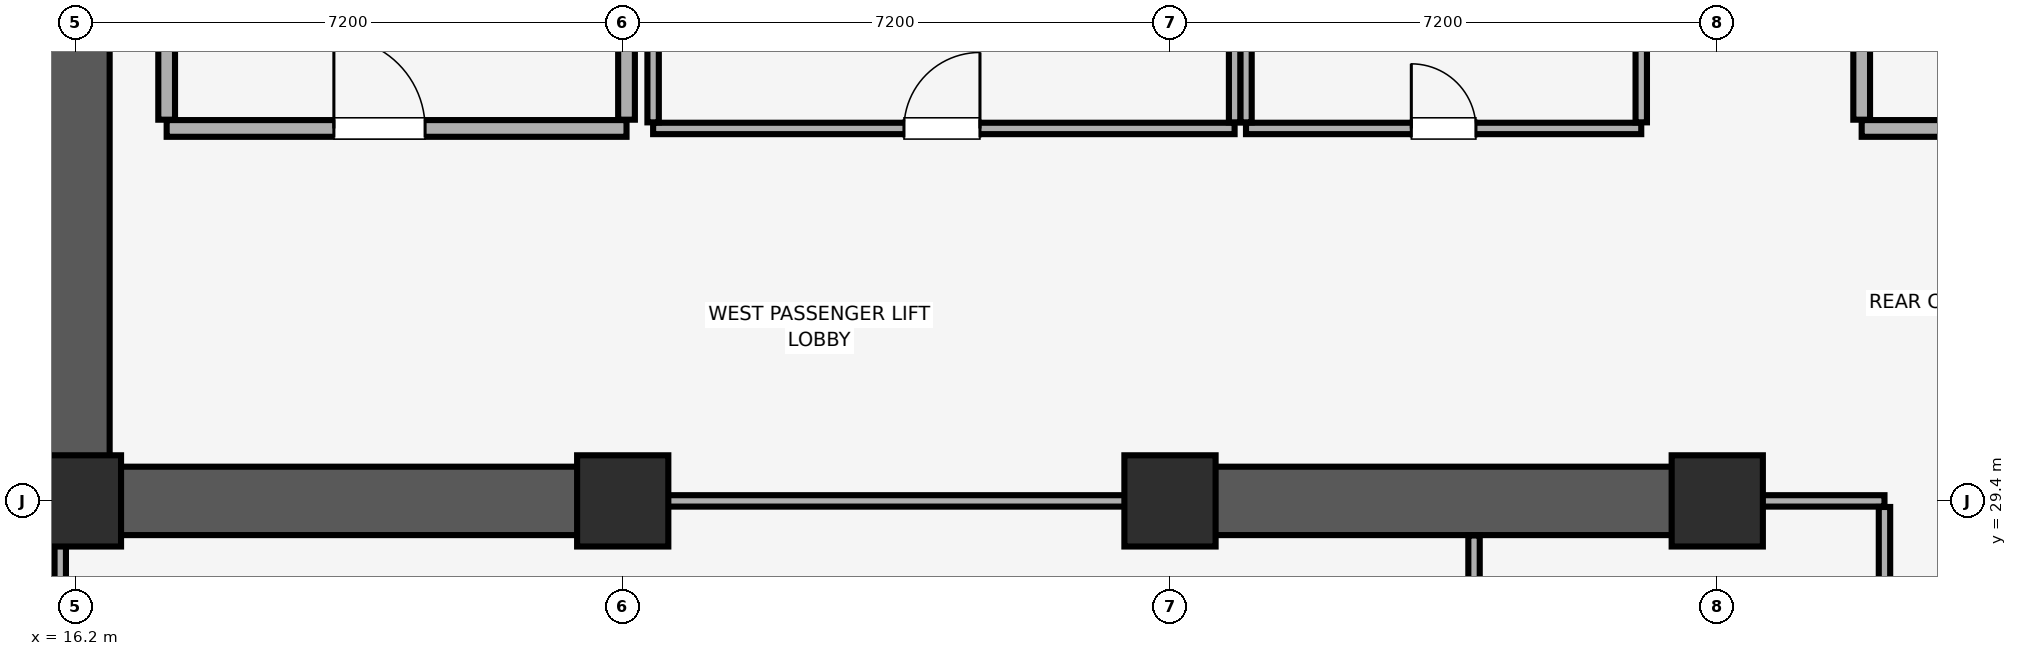
"""IFC4 building model, lengths in metres.
Left out: names, types, materials, properties, quantities, classifications, styles, units other than length and angle.
Written with IfcOpenShell. Run it as: python <this file> out.ifc"""

import sys

from ifc_helpers import new_model, si_unit, direction, frame, frame_2d, origin, origin_2d, place, context, subcontext, project, spatial, rectangle, extrude, element, fill, save


model = new_model("IFC4")
c1 = context("Model", 3, precision=1e-05, world=origin(), true_north=direction((0.0, 1.0)))
c2 = subcontext(c1, "Body", "Model", "MODEL_VIEW")
j1 = project(units=[si_unit("LENGTHUNIT", "METRE"), si_unit("PLANEANGLEUNIT", "RADIAN")], contexts=[c1])
p1 = place(None, origin())
s1 = spatial("IfcSite", under=j1, at=p1, CompositionType="ELEMENT")
p2 = place(p1, origin())
s2 = spatial("IfcBuilding", under=s1, at=p2, CompositionType="ELEMENT")
p3 = place(p2, frame((0.0, 0.0, 220.55)))
s3 = spatial("IfcBuildingStorey", under=s2, at=p3, CompositionType="ELEMENT", Elevation=220.55)
for number, where, z_axis, x_axis in (
    (1, (16.2, 29.4, 0.0), (0.0, 0.0, 1.0), (1.0, 0.0, 0.0)),
    (2, (23.4, 29.4, 0.0), (0.0, 0.0, 1.0), (1.0, 0.0, 0.0)),
    (3, (30.6, 29.4, 0.0), (0.0, 0.0, 1.0), (1.0, 0.0, 0.0)),
    (4, (37.8, 29.4, 0.0), (0.0, 0.0, 1.0), (1.0, 0.0, 0.0)),
):
    element("IfcColumn", number, at=place(p3, frame(where, z_axis=z_axis, x_axis=x_axis)), inside=s3, PredefinedType="COLUMN", context=c2, shape_type="SweptSolid", body=[
        extrude(rectangle(XDim=1.2, YDim=1.2, at=origin_2d()), origin(), (0.0, 0.0, 1.0), 3.56),
    ])
p4 = place(p3, frame((16.2, 29.4, 0.0), z_axis=(0.0, 0.0, 1.0), x_axis=(0.0, 1.0, 0.0)))
e5 = element("IfcWall", 5, at=p4, inside=s3, PredefinedType="SHEAR", context=c2, shape_type="SweptSolid", body=[
    extrude(rectangle(XDim=19.2, YDim=0.9, at=frame_2d((9.6, 0.0))), origin(), (0.0, 0.0, 1.0), 3.56),
])
p5 = place(p3, frame((16.655, 29.4, 0.0), z_axis=(0.0, 0.0, 1.0), x_axis=(1.0, 0.0, 0.0)))
e6 = element("IfcWall", 6, at=p5, inside=s3, PredefinedType="SHEAR", context=c2, shape_type="SweptSolid", body=[
    extrude(rectangle(XDim=6.945, YDim=0.9, at=frame_2d((3.473, 0.0))), origin(), (0.0, 0.0, 1.0), 3.56),
])
p6 = place(p3, frame((30.4, 29.4, 0.0), z_axis=(0.0, 0.0, 1.0), x_axis=(1.0, 0.0, 0.0)))
e7 = element("IfcWall", 7, at=p6, inside=s3, PredefinedType="SHEAR", context=c2, shape_type="SweptSolid", body=[
    extrude(rectangle(XDim=7.6, YDim=0.9, at=frame_2d((3.8, 0.0))), origin(), (0.0, 0.0, 1.0), 3.56),
])
p7 = place(p3, frame((17.4, 34.3, 0.0), z_axis=(0.0, 0.0, 1.0), x_axis=(1.0, 0.0, 0.0)))
e8 = element("IfcWall", 8, at=p7, inside=s3, PredefinedType="PARTITIONING", context=c2, shape_type="SweptSolid", body=[
    extrude(rectangle(XDim=6.05, YDim=0.22, at=frame_2d((3.025, 0.0))), origin(), (0.0, 0.0, 1.0), 3.56),
])
p8 = place(p7, frame((2.2, 0.0, 0.0)))
e9 = element("IfcOpeningElement", 9, at=p8, cuts=e8, PredefinedType="OPENING", context=c2, shape_type="SweptSolid", body=[
    extrude(rectangle(XDim=1.2, YDim=2.15, at=frame_2d((0.6, 1.075))), frame((0.0, 0.12, 0.0), z_axis=(0.0, -1.0, 0.0), x_axis=(1.0, 0.0, 0.0)), (0.0, 0.0, 1.0), 0.24),
])
p9 = place(p3, frame((17.4, 34.415, 0.0), z_axis=(0.0, 0.0, 1.0), x_axis=(0.0, 1.0, 0.0)))
e10 = element("IfcWall", 10, at=p9, inside=s3, PredefinedType="PARTITIONING", context=c2, shape_type="SweptSolid", body=[
    extrude(rectangle(XDim=5.43, YDim=0.22, at=frame_2d((2.715, 0.0))), origin(), (0.0, 0.0, 1.0), 3.56),
])
p10 = place(p3, frame((23.45, 34.415, 0.0), z_axis=(0.0, 0.0, 1.0), x_axis=(0.0, 1.0, 0.0)))
e11 = element("IfcWall", 11, at=p10, inside=s3, PredefinedType="PARTITIONING", context=c2, shape_type="SweptSolid", body=[
    extrude(rectangle(XDim=5.64, YDim=0.22, at=frame_2d((2.82, 0.0))), origin(), (0.0, 0.0, 1.0), 3.56),
])
p11 = place(p3, frame((39.7, 34.3, 0.0), z_axis=(0.0, 0.0, 1.0), x_axis=(1.0, 0.0, 0.0)))
e12 = element("IfcWall", 12, at=p11, inside=s3, PredefinedType="PARTITIONING", context=c2, shape_type="SweptSolid", body=[
    extrude(rectangle(XDim=4.6, YDim=0.22, at=frame_2d((2.3, 0.0))), origin(), (0.0, 0.0, 1.0), 3.56),
])
p12 = place(p11, frame((1.7, 0.0, 0.0)))
e13 = element("IfcOpeningElement", 13, at=p12, cuts=e12, PredefinedType="OPENING", context=c2, shape_type="SweptSolid", body=[
    extrude(rectangle(XDim=1.2, YDim=2.15, at=frame_2d((0.6, 1.075))), frame((0.0, 0.12, 0.0), z_axis=(0.0, -1.0, 0.0), x_axis=(1.0, 0.0, 0.0)), (0.0, 0.0, 1.0), 0.24),
])
p13 = place(p3, frame((39.7, 34.415, 0.0), z_axis=(0.0, 0.0, 1.0), x_axis=(0.0, 1.0, 0.0)))
e14 = element("IfcWall", 14, at=p13, inside=s3, PredefinedType="PARTITIONING", context=c2, shape_type="SweptSolid", body=[
    extrude(rectangle(XDim=5.785, YDim=0.22, at=frame_2d((2.893, 0.0))), origin(), (0.0, 0.0, 1.0), 3.56),
])
p14 = place(p3, frame((31.6, 34.3, 0.0), z_axis=(0.0, 0.0, 1.0), x_axis=(1.0, 0.0, 0.0)))
e15 = element("IfcWall", 15, at=p14, inside=s3, PredefinedType="PARTITIONING", context=c2, shape_type="SweptSolid", body=[
    extrude(rectangle(XDim=5.2, YDim=0.15, at=frame_2d((2.6, 0.0))), origin(), (0.0, 0.0, 1.0), 3.56),
])
p15 = place(p14, frame((2.175, 0.0, 0.0)))
e16 = element("IfcOpeningElement", 16, at=p15, cuts=e15, PredefinedType="OPENING", context=c2, shape_type="SweptSolid", body=[
    extrude(rectangle(XDim=0.85, YDim=2.1, at=frame_2d((0.425, 1.05))), frame((0.0, 0.085, 0.0), z_axis=(0.0, -1.0, 0.0), x_axis=(1.0, 0.0, 0.0)), (0.0, 0.0, 1.0), 0.17),
])
for number, where, z_axis, x_axis in (
    (17, (31.6, 34.38, 0.0), (0.0, 0.0, 1.0), (0.0, 1.0, 0.0)),
    (18, (36.8, 34.38, 0.0), (0.0, 0.0, 1.0), (0.0, 1.0, 0.0)),
):
    element("IfcWall", number, at=place(p3, frame(where, z_axis=z_axis, x_axis=x_axis)), inside=s3, PredefinedType="PARTITIONING", context=c2, shape_type="SweptSolid", body=[
        extrude(rectangle(XDim=4.94, YDim=0.15, at=frame_2d((2.47, 0.0))), origin(), (0.0, 0.0, 1.0), 3.56),
    ])
p16 = place(p3, frame((23.8, 34.3, 0.0), z_axis=(0.0, 0.0, 1.0), x_axis=(1.0, 0.0, 0.0)))
e19 = element("IfcWall", 19, at=p16, inside=s3, PredefinedType="PARTITIONING", context=c2, shape_type="SweptSolid", body=[
    extrude(rectangle(XDim=7.65, YDim=0.15, at=frame_2d((3.825, 0.0))), origin(), (0.0, 0.0, 1.0), 3.56),
])
p17 = place(p16, frame((3.3, 0.0, 0.0)))
e20 = element("IfcOpeningElement", 20, at=p17, cuts=e19, PredefinedType="OPENING", context=c2, shape_type="SweptSolid", body=[
    extrude(rectangle(XDim=1.0, YDim=2.15, at=frame_2d((0.5, 1.075))), frame((0.0, 0.085, 0.0), z_axis=(0.0, -1.0, 0.0), x_axis=(1.0, 0.0, 0.0)), (0.0, 0.0, 1.0), 0.17),
])
for number, where, z_axis, x_axis in (
    (21, (23.8, 34.38, 0.0), (0.0, 0.0, 1.0), (0.0, 1.0, 0.0)),
    (22, (31.45, 34.38, 0.0), (0.0, 0.0, 1.0), (0.0, 1.0, 0.0)),
):
    element("IfcWall", number, at=place(p3, frame(where, z_axis=z_axis, x_axis=x_axis)), inside=s3, PredefinedType="PARTITIONING", context=c2, shape_type="SweptSolid", body=[
        extrude(rectangle(XDim=4.94, YDim=0.15, at=frame_2d((2.47, 0.0))), origin(), (0.0, 0.0, 1.0), 3.56),
    ])
p18 = place(p3, frame((23.61, 29.4, 0.0), z_axis=(0.0, 0.0, 1.0), x_axis=(1.0, 0.0, 0.0)))
e23 = element("IfcWall", 23, at=p18, inside=s3, PredefinedType="PARTITIONING", context=c2, shape_type="SweptSolid", body=[
    extrude(rectangle(XDim=6.78, YDim=0.15, at=frame_2d((3.39, 0.0))), origin(), (0.0, 0.0, 1.0), 2.46),
])
p19 = place(p3, frame((16.0, 26.78, 0.0), z_axis=(0.0, 0.0, 1.0), x_axis=(0.0, 1.0, 0.0)))
e24 = element("IfcWall", 24, at=p19, inside=s3, PredefinedType="PARTITIONING", context=c2, shape_type="SweptSolid", body=[
    extrude(rectangle(XDim=2.61, YDim=0.15, at=frame_2d((1.305, 0.0))), origin(), (0.0, 0.0, 1.0), 3.06),
])
p20 = place(p3, frame((34.6, 26.78, 0.0), z_axis=(0.0, 0.0, 1.0), x_axis=(0.0, 1.0, 0.0)))
e25 = element("IfcWall", 25, at=p20, inside=s3, PredefinedType="PARTITIONING", context=c2, shape_type="SweptSolid", body=[
    extrude(rectangle(XDim=2.165, YDim=0.15, at=frame_2d((1.083, 0.0))), origin(), (0.0, 0.0, 1.0), 3.56),
])
p21 = place(p3, frame((38.01, 29.4, 0.0), z_axis=(0.0, 0.0, 1.0), x_axis=(1.0, 0.0, 0.0)))
e26 = element("IfcWall", 26, at=p21, inside=s3, PredefinedType="PARTITIONING", context=c2, shape_type="SweptSolid", body=[
    extrude(rectangle(XDim=1.99, YDim=0.15, at=frame_2d((0.995, 0.0))), origin(), (0.0, 0.0, 1.0), 2.46),
])
p22 = place(p3, frame((40.0, 26.78, 0.0), z_axis=(0.0, 0.0, 1.0), x_axis=(0.0, 1.0, 0.0)))
e27 = element("IfcWall", 27, at=p22, inside=s3, PredefinedType="PARTITIONING", context=c2, shape_type="SweptSolid", body=[
    extrude(rectangle(XDim=2.54, YDim=0.15, at=frame_2d((1.27, 0.0))), origin(), (0.0, 0.0, 1.0), 3.56),
])
p23 = place(p8, origin())
e28 = element("IfcDoor", 28, at=p23, inside=s3, OperationType="SINGLE_SWING_LEFT", PredefinedType="DOOR", context=c2, shape_type="SweptSolid", body=[
    extrude(rectangle(XDim=1.2, YDim=2.15, at=frame_2d((0.6, 1.075))), frame((0.0, 0.025, 0.0), z_axis=(0.0, -1.0, 0.0), x_axis=(1.0, 0.0, 0.0)), (0.0, 0.0, 1.0), 0.05),
])
fill(e9, e28)
p24 = place(p15, origin())
e29 = element("IfcDoor", 29, at=p24, inside=s3, OperationType="SINGLE_SWING_LEFT", PredefinedType="DOOR", context=c2, shape_type="SweptSolid", body=[
    extrude(rectangle(XDim=0.85, YDim=2.1, at=frame_2d((0.425, 1.05))), frame((0.0, 0.025, 0.0), z_axis=(0.0, -1.0, 0.0), x_axis=(1.0, 0.0, 0.0)), (0.0, 0.0, 1.0), 0.05),
])
fill(e16, e29)
p25 = place(p17, origin())
e30 = element("IfcDoor", 30, at=p25, inside=s3, OperationType="SINGLE_SWING_RIGHT", PredefinedType="DOOR", context=c2, shape_type="SweptSolid", body=[
    extrude(rectangle(XDim=1.0, YDim=2.15, at=frame_2d((0.5, 1.075))), frame((0.0, 0.025, 0.0), z_axis=(0.0, -1.0, 0.0), x_axis=(1.0, 0.0, 0.0)), (0.0, 0.0, 1.0), 0.05),
])
fill(e20, e30)
save(model, sys.argv[1])
